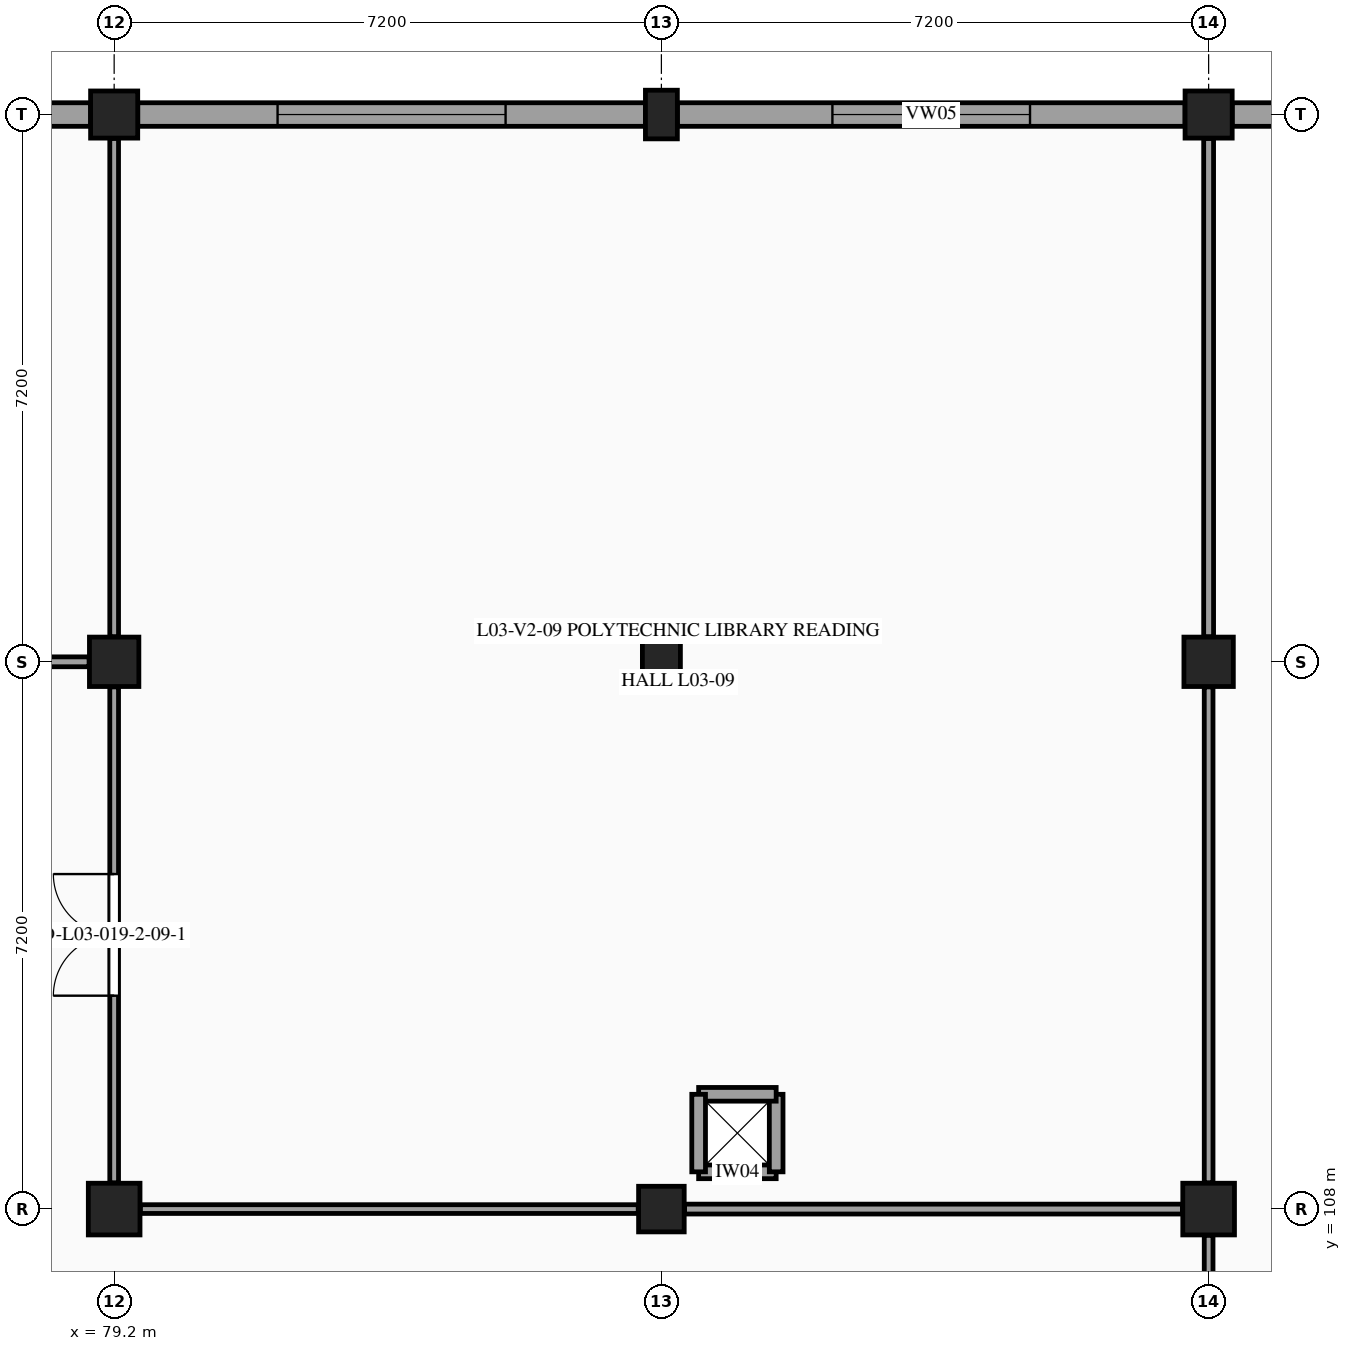
"""IFC4 building model, lengths in metres.
Left out: names, types, materials, properties, quantities, classifications, styles, units other than length and angle.
Written with IfcOpenShell. Run it as: python <this file> out.ifc"""

import sys

from ifc_helpers import new_model, si_unit, direction, frame, frame_2d, origin, origin_2d, place, context, subcontext, project, spatial, rectangle, extrude, element, fill, save


model = new_model("IFC4")
c1 = context("Model", 3, precision=1e-05, world=origin(), true_north=direction((0.0, 1.0)))
c2 = subcontext(c1, "Body", "Model", "MODEL_VIEW")
j1 = project(units=[si_unit("LENGTHUNIT", "METRE"), si_unit("PLANEANGLEUNIT", "RADIAN")], contexts=[c1])
p1 = place(None, origin())
s1 = spatial("IfcSite", under=j1, at=p1, CompositionType="ELEMENT")
p2 = place(p1, origin())
s2 = spatial("IfcBuilding", under=s1, at=p2, CompositionType="ELEMENT")
p3 = place(p2, frame((0.0, 0.0, 14.4)))
s3 = spatial("IfcBuildingStorey", under=s2, at=p3, CompositionType="ELEMENT", Elevation=14.4)
p4 = place(p3, frame((79.2, 108.0, 0.0), z_axis=(0.0, 0.0, 1.0), x_axis=(1.0, 0.0, 0.0)))
e1 = element("IfcColumn", 1, at=p4, inside=s3, PredefinedType="COLUMN", context=c2, shape_type="SweptSolid", body=[
    extrude(rectangle(XDim=0.68, YDim=0.68, at=origin_2d()), origin(), (0.0, 0.0, 1.0), 4.2),
])
p5 = place(p3, frame((79.2, 115.2, 0.0), z_axis=(0.0, 0.0, 1.0), x_axis=(1.0, 0.0, 0.0)))
e2 = element("IfcColumn", 2, at=p5, inside=s3, PredefinedType="COLUMN", context=c2, shape_type="SweptSolid", body=[
    extrude(rectangle(XDim=0.65, YDim=0.65, at=origin_2d()), origin(), (0.0, 0.0, 1.0), 4.2),
])
p6 = place(p3, frame((79.2, 122.4, 0.0), z_axis=(0.0, 0.0, 1.0), x_axis=(1.0, 0.0, 0.0)))
e3 = element("IfcColumn", 3, at=p6, inside=s3, PredefinedType="COLUMN", context=c2, shape_type="SweptSolid", body=[
    extrude(rectangle(XDim=0.62, YDim=0.62, at=origin_2d()), origin(), (0.0, 0.0, 1.0), 4.2),
])
p7 = place(p3, frame((86.4, 108.0, 0.0), z_axis=(0.0, 0.0, 1.0), x_axis=(1.0, 0.0, 0.0)))
e4 = element("IfcColumn", 4, at=p7, inside=s3, PredefinedType="COLUMN", context=c2, shape_type="SweptSolid", body=[
    extrude(rectangle(XDim=0.6, YDim=0.6, at=origin_2d()), origin(), (0.0, 0.0, 1.0), 4.2),
])
p8 = place(p3, frame((86.4, 115.2, 0.0), z_axis=(0.0, 0.0, 1.0), x_axis=(1.0, 0.0, 0.0)))
e5 = element("IfcColumn", 5, at=p8, inside=s3, PredefinedType="COLUMN", context=c2, shape_type="SweptSolid", body=[
    extrude(rectangle(XDim=0.5, YDim=0.75, at=origin_2d()), origin(), (0.0, 0.0, 1.0), 4.2),
])
p9 = place(p3, frame((86.4, 122.4, 0.0), z_axis=(0.0, 0.0, 1.0), x_axis=(1.0, 0.0, 0.0)))
e6 = element("IfcColumn", 6, at=p9, inside=s3, PredefinedType="PILASTER", context=c2, shape_type="SweptSolid", body=[
    extrude(rectangle(XDim=0.42, YDim=0.64, at=origin_2d()), origin(), (0.0, 0.0, 1.0), 4.2),
])
p10 = place(p3, frame((93.6, 108.0, 0.0), z_axis=(0.0, 0.0, 1.0), x_axis=(1.0, 0.0, 0.0)))
e7 = element("IfcColumn", 7, at=p10, inside=s3, PredefinedType="COLUMN", context=c2, shape_type="SweptSolid", body=[
    extrude(rectangle(XDim=0.68, YDim=0.68, at=origin_2d()), origin(), (0.0, 0.0, 1.0), 4.2),
])
p11 = place(p3, frame((93.6, 115.2, 0.0), z_axis=(0.0, 0.0, 1.0), x_axis=(1.0, 0.0, 0.0)))
e8 = element("IfcColumn", 8, at=p11, inside=s3, PredefinedType="COLUMN", context=c2, shape_type="SweptSolid", body=[
    extrude(rectangle(XDim=0.65, YDim=0.65, at=origin_2d()), origin(), (0.0, 0.0, 1.0), 4.2),
])
p12 = place(p3, frame((93.6, 122.4, 0.0), z_axis=(0.0, 0.0, 1.0), x_axis=(1.0, 0.0, 0.0)))
e9 = element("IfcColumn", 9, at=p12, inside=s3, PredefinedType="COLUMN", context=c2, shape_type="SweptSolid", body=[
    extrude(rectangle(XDim=0.62, YDim=0.62, at=origin_2d()), origin(), (0.0, 0.0, 1.0), 4.2),
])
p13 = place(p3, frame((72.21, 122.4, 0.0), z_axis=(0.0, 0.0, 1.0), x_axis=(1.0, 0.0, 0.0)))
e10 = element("IfcWall", 10, at=p13, inside=s3, PredefinedType="STANDARD", context=c2, shape_type="SweptSolid", body=[
    extrude(rectangle(XDim=6.68, YDim=0.31, at=frame_2d((3.34, 0.0))), origin(), (0.0, 0.0, 1.0), 3.185),
])
p14 = place(p13, frame((1.64, 0.0, 0.98)))
e11 = element("IfcOpeningElement", 11, at=p14, cuts=e10, PredefinedType="OPENING", context=c2, shape_type="SweptSolid", body=[
    extrude(rectangle(XDim=3.4, YDim=1.55, at=frame_2d((1.7, 0.775))), frame((0.0, 0.165, 0.0), z_axis=(0.0, -1.0, 0.0), x_axis=(1.0, 0.0, 0.0)), (0.0, 0.0, 1.0), 0.33),
])
p15 = place(p3, frame((79.51, 122.4, 0.0), z_axis=(0.0, 0.0, 1.0), x_axis=(1.0, 0.0, 0.0)))
e12 = element("IfcWall", 12, at=p15, inside=s3, PredefinedType="STANDARD", context=c2, shape_type="SweptSolid", body=[
    extrude(rectangle(XDim=6.68, YDim=0.31, at=frame_2d((3.34, 0.0))), origin(), (0.0, 0.0, 1.0), 3.185),
])
p16 = place(p15, frame((1.84, 0.0, 0.98)))
e13 = element("IfcOpeningElement", 13, at=p16, cuts=e12, PredefinedType="OPENING", context=c2, shape_type="SweptSolid", body=[
    extrude(rectangle(XDim=3.0, YDim=1.5, at=frame_2d((1.5, 0.75))), frame((0.0, 0.165, 0.0), z_axis=(0.0, -1.0, 0.0), x_axis=(1.0, 0.0, 0.0)), (0.0, 0.0, 1.0), 0.33),
])
p17 = place(p3, frame((86.61, 122.4, 0.0), z_axis=(0.0, 0.0, 1.0), x_axis=(1.0, 0.0, 0.0)))
e14 = element("IfcWall", 14, at=p17, inside=s3, PredefinedType="STANDARD", context=c2, shape_type="SweptSolid", body=[
    extrude(rectangle(XDim=6.68, YDim=0.31, at=frame_2d((3.34, 0.0))), origin(), (0.0, 0.0, 1.0), 3.185),
])
p18 = place(p17, frame((2.04, 0.0, 0.98)))
e15 = element("IfcOpeningElement", 15, at=p18, cuts=e14, PredefinedType="OPENING", context=c2, shape_type="SweptSolid", body=[
    extrude(rectangle(XDim=2.6, YDim=1.5, at=frame_2d((1.3, 0.75))), frame((0.0, 0.165, 0.0), z_axis=(0.0, -1.0, 0.0), x_axis=(1.0, 0.0, 0.0)), (0.0, 0.0, 1.0), 0.33),
])
p19 = place(p3, frame((93.91, 122.4, 0.0), z_axis=(0.0, 0.0, 1.0), x_axis=(1.0, 0.0, 0.0)))
e16 = element("IfcWall", 16, at=p19, inside=s3, PredefinedType="STANDARD", context=c2, shape_type="SweptSolid", body=[
    extrude(rectangle(XDim=6.68, YDim=0.31, at=frame_2d((3.34, 0.0))), origin(), (0.0, 0.0, 1.0), 3.16),
])
p20 = place(p19, frame((2.24, 0.0, 0.98)))
e17 = element("IfcOpeningElement", 17, at=p20, cuts=e16, PredefinedType="OPENING", context=c2, shape_type="SweptSolid", body=[
    extrude(rectangle(XDim=2.2, YDim=1.45, at=frame_2d((1.1, 0.725))), frame((0.0, 0.165, 0.0), z_axis=(0.0, -1.0, 0.0), x_axis=(1.0, 0.0, 0.0)), (0.0, 0.0, 1.0), 0.33),
])
for number, where, z_axis, x_axis in (
    (18, (86.89, 108.49, 0.0), (0.0, 0.0, 1.0), (1.0, 0.0, 0.0)),
    (19, (87.91, 108.49, 0.0), (0.0, 0.0, 1.0), (0.0, 1.0, 0.0)),
    (20, (87.91, 109.51, 0.0), (0.0, 0.0, 1.0), (-1.0, 0.0, 0.0)),
    (21, (86.89, 109.51, 0.0), (0.0, 0.0, 1.0), (0.0, -1.0, 0.0)),
):
    element("IfcWall", number, at=place(p3, frame(where, z_axis=z_axis, x_axis=x_axis)), inside=s3, PredefinedType="PARTITIONING", context=c2, shape_type="SweptSolid", body=[
        extrude(rectangle(XDim=1.02, YDim=0.18, at=frame_2d((0.51, 0.0))), origin(), (0.0, 0.0, 1.0), 3.94),
    ])
p21 = place(p3, frame((79.2, 108.345, 0.0), z_axis=(0.0, 0.0, 1.0), x_axis=(0.0, 1.0, 0.0)))
e22 = element("IfcWall", 22, at=p21, inside=s3, PredefinedType="PARTITIONING", context=c2, shape_type="SweptSolid", body=[
    extrude(rectangle(XDim=6.525, YDim=0.115, at=frame_2d((3.263, 0.0))), origin(), (0.0, 0.0, 1.0), 3.245),
])
p22 = place(p21, frame((2.462, 0.0, 0.0)))
e23 = element("IfcOpeningElement", 23, at=p22, cuts=e22, PredefinedType="OPENING", context=c2, shape_type="SweptSolid", body=[
    extrude(rectangle(XDim=1.6, YDim=2.2, at=frame_2d((0.8, 1.1))), frame((0.0, 0.067, 0.0), z_axis=(0.0, -1.0, 0.0), x_axis=(1.0, 0.0, 0.0)), (0.0, 0.0, 1.0), 0.135),
])
p23 = place(p3, frame((72.255, 115.2, 0.0), z_axis=(0.0, 0.0, 1.0), x_axis=(1.0, 0.0, 0.0)))
e24 = element("IfcWall", 24, at=p23, inside=s3, PredefinedType="PARTITIONING", context=c2, shape_type="SweptSolid", body=[
    extrude(rectangle(XDim=6.615, YDim=0.13, at=frame_2d((3.308, 0.0))), origin(), (0.0, 0.0, 1.0), 3.215),
])
p24 = place(p3, frame((79.2, 115.53, 0.0), z_axis=(0.0, 0.0, 1.0), x_axis=(0.0, 1.0, 0.0)))
e25 = element("IfcWall", 25, at=p24, inside=s3, PredefinedType="PARTITIONING", context=c2, shape_type="SweptSolid", body=[
    extrude(rectangle(XDim=6.555, YDim=0.115, at=frame_2d((3.277, 0.0))), origin(), (0.0, 0.0, 1.0), 3.245),
])
p25 = place(p3, frame((79.545, 108.0, 0.0), z_axis=(0.0, 0.0, 1.0), x_axis=(1.0, 0.0, 0.0)))
e26 = element("IfcWall", 26, at=p25, inside=s3, PredefinedType="PARTITIONING", context=c2, shape_type="SweptSolid", body=[
    extrude(rectangle(XDim=6.55, YDim=0.115, at=frame_2d((3.275, 0.0))), origin(), (0.0, 0.0, 1.0), 3.22),
])
p26 = place(p3, frame((93.6, 101.125, 0.0), z_axis=(0.0, 0.0, 1.0), x_axis=(0.0, 1.0, 0.0)))
e27 = element("IfcWall", 27, at=p26, inside=s3, PredefinedType="PARTITIONING", context=c2, shape_type="SweptSolid", body=[
    extrude(rectangle(XDim=6.53, YDim=0.115, at=frame_2d((3.265, 0.0))), origin(), (0.0, 0.0, 1.0), 3.225),
])
p27 = place(p26, frame((2.715, 0.0, 0.0)))
e28 = element("IfcOpeningElement", 28, at=p27, cuts=e27, PredefinedType="OPENING", context=c2, shape_type="SweptSolid", body=[
    extrude(rectangle(XDim=1.1, YDim=2.15, at=frame_2d((0.55, 1.075))), frame((0.0, 0.067, 0.0), z_axis=(0.0, -1.0, 0.0), x_axis=(1.0, 0.0, 0.0)), (0.0, 0.0, 1.0), 0.135),
])
p28 = place(p3, frame((86.705, 108.0, 0.0), z_axis=(0.0, 0.0, 1.0), x_axis=(1.0, 0.0, 0.0)))
e29 = element("IfcWall", 29, at=p28, inside=s3, PredefinedType="PARTITIONING", context=c2, shape_type="SweptSolid", body=[
    extrude(rectangle(XDim=6.55, YDim=0.13, at=frame_2d((3.275, 0.0))), origin(), (0.0, 0.0, 1.0), 3.24),
])
p29 = place(p3, frame((93.6, 108.345, 0.0), z_axis=(0.0, 0.0, 1.0), x_axis=(0.0, 1.0, 0.0)))
e30 = element("IfcWall", 30, at=p29, inside=s3, PredefinedType="PARTITIONING", context=c2, shape_type="SweptSolid", body=[
    extrude(rectangle(XDim=6.525, YDim=0.115, at=frame_2d((3.263, 0.0))), origin(), (0.0, 0.0, 1.0), 3.22),
])
p30 = place(p3, frame((93.6, 115.53, 0.0), z_axis=(0.0, 0.0, 1.0), x_axis=(0.0, 1.0, 0.0)))
e31 = element("IfcWall", 31, at=p30, inside=s3, PredefinedType="PARTITIONING", context=c2, shape_type="SweptSolid", body=[
    extrude(rectangle(XDim=6.555, YDim=0.13, at=frame_2d((3.277, 0.0))), origin(), (0.0, 0.0, 1.0), 3.22),
])
p31 = place(p16, origin())
e32 = element("IfcWindow", 32, at=p31, inside=s3, PartitioningType="SINGLE_PANEL", PredefinedType="WINDOW", context=c2, shape_type="SweptSolid", body=[
    extrude(rectangle(XDim=3.0, YDim=1.5, at=frame_2d((1.5, 0.75))), frame((0.0, -0.03, 0.0), z_axis=(0.0, -1.0, 0.0), x_axis=(1.0, 0.0, 0.0)), (0.0, 0.0, 1.0), 0.06),
])
fill(e13, e32)
p32 = place(p18, origin())
e33 = element("IfcWindow", 33, at=p32, inside=s3, PartitioningType="SINGLE_PANEL", PredefinedType="WINDOW", context=c2, shape_type="SweptSolid", body=[
    extrude(rectangle(XDim=2.6, YDim=1.5, at=frame_2d((1.3, 0.75))), frame((0.0, -0.03, 0.0), z_axis=(0.0, -1.0, 0.0), x_axis=(1.0, 0.0, 0.0)), (0.0, 0.0, 1.0), 0.06),
])
fill(e15, e33)
p33 = place(p22, origin())
e34 = element("IfcDoor", 34, at=p33, inside=s3, OperationType="DOUBLE_DOOR_SINGLE_SWING", PredefinedType="DOOR", context=c2, shape_type="SweptSolid", body=[
    extrude(rectangle(XDim=1.6, YDim=2.2, at=frame_2d((0.8, 1.1))), frame((0.0, 0.025, 0.0), z_axis=(0.0, -1.0, 0.0), x_axis=(1.0, 0.0, 0.0)), (0.0, 0.0, 1.0), 0.05),
])
fill(e23, e34)
save(model, sys.argv[1])
